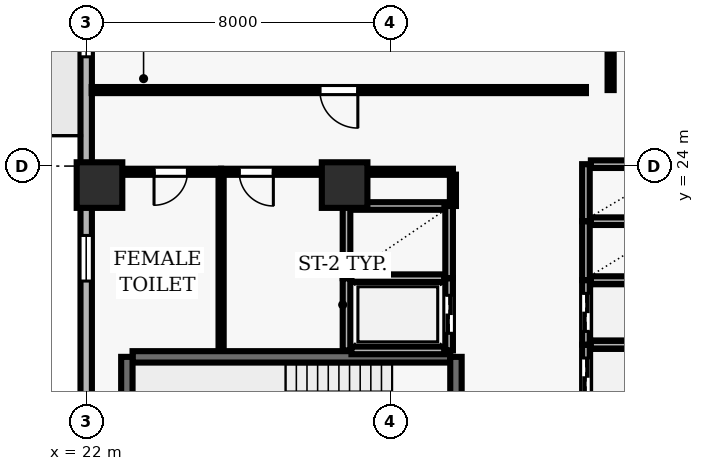
"""IFC4 building model, lengths in metres.
Left out: names, types, materials, properties, quantities, classifications, styles, units other than length and angle.
Written with IfcOpenShell. Run it as: python <this file> out.ifc"""

import sys

from ifc_helpers import new_model, si_unit, direction, frame, frame_2d, origin, origin_2d, place, context, subcontext, project, spatial, rectangle, extrude, element, fill, save


model = new_model("IFC4")
c1 = context("Model", 3, precision=1e-05, world=origin(), true_north=direction((0.0, 1.0)))
c2 = subcontext(c1, "Body", "Model", "MODEL_VIEW")
j1 = project(units=[si_unit("LENGTHUNIT", "METRE"), si_unit("PLANEANGLEUNIT", "RADIAN")], contexts=[c1])
p1 = place(None, origin())
s1 = spatial("IfcSite", under=j1, at=p1, CompositionType="ELEMENT")
p2 = place(p1, origin())
s2 = spatial("IfcBuilding", under=s1, at=p2, CompositionType="ELEMENT")
p3 = place(p2, frame((0.0, 0.0, 103.4)))
s3 = spatial("IfcBuildingStorey", under=s2, at=p3, CompositionType="ELEMENT", Elevation=103.4)
for number, where, z_axis, x_axis in (
    (1, (22.35, 23.5, 0.0), (0.0, 0.0, 1.0), (1.0, 0.0, 0.0)),
    (2, (28.8, 23.5, 0.0), (0.0, 0.0, 1.0), (1.0, 0.0, 0.0)),
):
    element("IfcColumn", number, at=place(p3, frame(where, z_axis=z_axis, x_axis=x_axis)), inside=s3, PredefinedType="COLUMN", context=c2, shape_type="SweptSolid", body=[
        extrude(rectangle(XDim=1.2, YDim=1.2, at=origin_2d()), origin(), (0.0, 0.0, 1.0), 3.9),
    ])
p4 = place(p3, frame((22.0, 46.1, 0.0), z_axis=(0.0, 0.0, 1.0), x_axis=(0.0, -1.0, 0.0)))
e3 = element("IfcWall", 3, at=p4, inside=s3, PredefinedType="SOLIDWALL", context=c2, shape_type="SweptSolid", body=[
    extrude(rectangle(XDim=43.6, YDim=0.3, at=frame_2d((21.8, 0.0))), origin(), (0.0, 0.0, 1.0), 3.69),
])
p5 = place(p4, frame((7.1, 0.0, 0.0)))
e4 = element("IfcOpeningElement", 4, at=p5, cuts=e3, PredefinedType="OPENING", context=c2, shape_type="SweptSolid", body=[
    extrude(rectangle(XDim=1.0, YDim=2.2, at=frame_2d((0.5, 1.1))), frame((0.0, 0.16, 0.0), z_axis=(0.0, -1.0, 0.0), x_axis=(1.0, 0.0, 0.0)), (0.0, 0.0, 1.0), 0.32),
])
p6 = place(p4, frame((2.125, 0.0, 0.9)))
e5 = element("IfcOpeningElement", 5, at=p6, cuts=e3, PredefinedType="OPENING", context=c2, shape_type="SweptSolid", body=[
    extrude(rectangle(XDim=1.2, YDim=1.6, at=frame_2d((0.6, 0.8))), frame((0.0, 0.16, 0.0), z_axis=(0.0, -1.0, 0.0), x_axis=(1.0, 0.0, 0.0)), (0.0, 0.0, 1.0), 0.32),
])
p7 = place(p4, frame((8.475, 0.0, 0.9)))
e6 = element("IfcOpeningElement", 6, at=p7, cuts=e3, PredefinedType="OPENING", context=c2, shape_type="SweptSolid", body=[
    extrude(rectangle(XDim=1.2, YDim=1.6, at=frame_2d((0.6, 0.8))), frame((0.0, 0.16, 0.0), z_axis=(0.0, -1.0, 0.0), x_axis=(1.0, 0.0, 0.0)), (0.0, 0.0, 1.0), 0.32),
])
p8 = place(p4, frame((13.025, 0.0, 0.9)))
e7 = element("IfcOpeningElement", 7, at=p8, cuts=e3, PredefinedType="OPENING", context=c2, shape_type="SweptSolid", body=[
    extrude(rectangle(XDim=1.2, YDim=1.6, at=frame_2d((0.6, 0.8))), frame((0.0, 0.16, 0.0), z_axis=(0.0, -1.0, 0.0), x_axis=(1.0, 0.0, 0.0)), (0.0, 0.0, 1.0), 0.32),
])
p9 = place(p4, frame((18.025, 0.0, 0.9)))
e8 = element("IfcOpeningElement", 8, at=p9, cuts=e3, PredefinedType="OPENING", context=c2, shape_type="SweptSolid", body=[
    extrude(rectangle(XDim=1.2, YDim=1.6, at=frame_2d((0.6, 0.8))), frame((0.0, 0.16, 0.0), z_axis=(0.0, -1.0, 0.0), x_axis=(1.0, 0.0, 0.0)), (0.0, 0.0, 1.0), 0.32),
])
p10 = place(p4, frame((23.925, 0.0, 0.9)))
e9 = element("IfcOpeningElement", 9, at=p10, cuts=e3, PredefinedType="OPENING", context=c2, shape_type="SweptSolid", body=[
    extrude(rectangle(XDim=1.2, YDim=1.6, at=frame_2d((0.6, 0.8))), frame((0.0, 0.16, 0.0), z_axis=(0.0, -1.0, 0.0), x_axis=(1.0, 0.0, 0.0)), (0.0, 0.0, 1.0), 0.32),
])
p11 = place(p4, frame((29.375, 0.0, 0.9)))
e10 = element("IfcOpeningElement", 10, at=p11, cuts=e3, PredefinedType="OPENING", context=c2, shape_type="SweptSolid", body=[
    extrude(rectangle(XDim=1.2, YDim=1.6, at=frame_2d((0.6, 0.8))), frame((0.0, 0.16, 0.0), z_axis=(0.0, -1.0, 0.0), x_axis=(1.0, 0.0, 0.0)), (0.0, 0.0, 1.0), 0.32),
])
p12 = place(p4, frame((34.825, 0.0, 0.9)))
e11 = element("IfcOpeningElement", 11, at=p12, cuts=e3, PredefinedType="OPENING", context=c2, shape_type="SweptSolid", body=[
    extrude(rectangle(XDim=1.2, YDim=1.6, at=frame_2d((0.6, 0.8))), frame((0.0, 0.16, 0.0), z_axis=(0.0, -1.0, 0.0), x_axis=(1.0, 0.0, 0.0)), (0.0, 0.0, 1.0), 0.32),
])
p13 = place(p3, frame((31.58, 18.98, 0.0), z_axis=(0.0, 0.0, 1.0), x_axis=(-1.0, 0.0, 0.0)))
e12 = element("IfcWall", 12, at=p13, inside=s3, PredefinedType="SHEAR", context=c2, shape_type="SweptSolid", body=[
    extrude(rectangle(XDim=8.36, YDim=0.3, at=frame_2d((4.18, 0.0))), origin(), (0.0, 0.0, 1.0), 3.69),
])
p14 = place(p3, frame((23.07, 18.98, 0.0), z_axis=(0.0, 0.0, 1.0), x_axis=(0.0, -1.0, 0.0)))
e13 = element("IfcWall", 13, at=p14, inside=s3, PredefinedType="SHEAR", context=c2, shape_type="SweptSolid", body=[
    extrude(rectangle(XDim=3.51, YDim=0.3, at=frame_2d((1.755, 0.0))), origin(), (0.0, 0.0, 1.0), 3.69),
])
p15 = place(p3, frame((31.73, 15.47, 0.0), z_axis=(0.0, 0.0, 1.0), x_axis=(0.0, 1.0, 0.0)))
e14 = element("IfcWall", 14, at=p15, inside=s3, PredefinedType="SHEAR", context=c2, shape_type="SweptSolid", body=[
    extrude(rectangle(XDim=3.51, YDim=0.3, at=frame_2d((1.755, 0.0))), origin(), (0.0, 0.0, 1.0), 3.69),
])
p16 = place(p15, frame((1.18, 0.0, 0.0)))
e15 = element("IfcOpeningElement", 15, at=p16, cuts=e14, PredefinedType="OPENING", context=c2, shape_type="SweptSolid", body=[
    extrude(rectangle(XDim=1.15, YDim=2.15, at=frame_2d((0.575, 1.075))), frame((0.0, 0.16, 0.0), z_axis=(0.0, -1.0, 0.0), x_axis=(1.0, 0.0, 0.0)), (0.0, 0.0, 1.0), 0.32),
])
p17 = place(p3, frame((35.15, 19.3, 0.0), z_axis=(0.0, 0.0, 1.0), x_axis=(0.0, -1.0, 0.0)))
e16 = element("IfcWall", 16, at=p17, inside=s3, PredefinedType="SOLIDWALL", context=c2, shape_type="SweptSolid", body=[
    extrude(rectangle(XDim=1.7, YDim=0.2, at=frame_2d((0.85, 0.0))), origin(), (0.0, 0.0, 1.0), 3.69),
])
p18 = place(p17, frame((0.35, 0.0, 0.0)))
e17 = element("IfcOpeningElement", 17, at=p18, cuts=e16, PredefinedType="OPENING", context=c2, shape_type="SweptSolid", body=[
    extrude(rectangle(XDim=1.0, YDim=2.1, at=frame_2d((0.5, 1.05))), frame((0.0, 0.11, 0.0), z_axis=(0.0, -1.0, 0.0), x_axis=(1.0, 0.0, 0.0)), (0.0, 0.0, 1.0), 0.22),
])
p19 = place(p3, frame((37.42, 19.3, 0.0), z_axis=(0.0, 0.0, 1.0), x_axis=(-1.0, 0.0, 0.0)))
e18 = element("IfcWall", 18, at=p19, inside=s3, PredefinedType="SOLIDWALL", context=c2, shape_type="SweptSolid", body=[
    extrude(rectangle(XDim=2.14, YDim=0.2, at=frame_2d((1.07, 0.0))), origin(), (0.0, 0.0, 1.0), 3.69),
])
p20 = place(p3, frame((35.15, 21.0, 0.0), z_axis=(0.0, 0.0, 1.0), x_axis=(0.0, -1.0, 0.0)))
e19 = element("IfcWall", 19, at=p20, inside=s3, PredefinedType="SOLIDWALL", context=c2, shape_type="SweptSolid", body=[
    extrude(rectangle(XDim=1.7, YDim=0.2, at=frame_2d((0.85, 0.0))), origin(), (0.0, 0.0, 1.0), 3.69),
])
p21 = place(p20, frame((0.35, 0.0, 0.0)))
e20 = element("IfcOpeningElement", 20, at=p21, cuts=e19, PredefinedType="OPENING", context=c2, shape_type="SweptSolid", body=[
    extrude(rectangle(XDim=1.0, YDim=2.1, at=frame_2d((0.5, 1.05))), frame((0.0, 0.11, 0.0), z_axis=(0.0, -1.0, 0.0), x_axis=(1.0, 0.0, 0.0)), (0.0, 0.0, 1.0), 0.22),
])
p22 = place(p3, frame((37.42, 21.0, 0.0), z_axis=(0.0, 0.0, 1.0), x_axis=(-1.0, 0.0, 0.0)))
e21 = element("IfcWall", 21, at=p22, inside=s3, PredefinedType="SOLIDWALL", context=c2, shape_type="SweptSolid", body=[
    extrude(rectangle(XDim=2.14, YDim=0.2, at=frame_2d((1.07, 0.0))), origin(), (0.0, 0.0, 1.0), 3.69),
])
p23 = place(p3, frame((28.85, 21.05, 0.0), z_axis=(0.0, 0.0, 1.0), x_axis=(0.0, -1.0, 0.0)))
e22 = element("IfcWall", 22, at=p23, inside=s3, PredefinedType="SOLIDWALL", context=c2, shape_type="SweptSolid", body=[
    extrude(rectangle(XDim=1.9, YDim=0.2, at=frame_2d((0.95, 0.0))), origin(), (0.0, 0.0, 1.0), 3.69),
])
p24 = place(p3, frame((31.55, 19.15, 0.0), z_axis=(0.0, 0.0, 1.0), x_axis=(0.0, 1.0, 0.0)))
e23 = element("IfcWall", 23, at=p24, inside=s3, PredefinedType="SOLIDWALL", context=c2, shape_type="SweptSolid", body=[
    extrude(rectangle(XDim=1.9, YDim=0.2, at=frame_2d((0.95, 0.0))), origin(), (0.0, 0.0, 1.0), 3.69),
])
p25 = place(p24, frame((0.45, 0.0, 0.0)))
e24 = element("IfcOpeningElement", 24, at=p25, cuts=e23, PredefinedType="OPENING", context=c2, shape_type="SweptSolid", body=[
    extrude(rectangle(XDim=1.0, YDim=2.1, at=frame_2d((0.5, 1.05))), frame((0.0, 0.11, 0.0), z_axis=(0.0, -1.0, 0.0), x_axis=(1.0, 0.0, 0.0)), (0.0, 0.0, 1.0), 0.22),
])
for number, where, z_axis, x_axis in (
    (25, (28.98, 19.15, 0.0), (0.0, 0.0, 1.0), (1.0, 0.0, 0.0)),
    (26, (31.42, 21.05, 0.0), (0.0, 0.0, 1.0), (-1.0, 0.0, 0.0)),
):
    element("IfcWall", number, at=place(p3, frame(where, z_axis=z_axis, x_axis=x_axis)), inside=s3, PredefinedType="SOLIDWALL", context=c2, shape_type="SweptSolid", body=[
        extrude(rectangle(XDim=2.44, YDim=0.2, at=frame_2d((1.22, 0.0))), origin(), (0.0, 0.0, 1.0), 3.69),
    ])
p26 = place(p3, frame((35.15, 22.55, 0.0), z_axis=(0.0, 0.0, 1.0), x_axis=(0.0, -1.0, 0.0)))
e27 = element("IfcWall", 27, at=p26, inside=s3, PredefinedType="SOLIDWALL", context=c2, shape_type="SweptSolid", body=[
    extrude(rectangle(XDim=1.55, YDim=0.2, at=frame_2d((0.775, 0.0))), origin(), (0.0, 0.0, 1.0), 3.69),
])
p27 = place(p3, frame((37.42, 22.55, 0.0), z_axis=(0.0, 0.0, 1.0), x_axis=(-1.0, 0.0, 0.0)))
e28 = element("IfcWall", 28, at=p27, inside=s3, PredefinedType="SOLIDWALL", context=c2, shape_type="SweptSolid", body=[
    extrude(rectangle(XDim=2.14, YDim=0.2, at=frame_2d((1.07, 0.0))), origin(), (0.0, 0.0, 1.0), 3.69),
])
p28 = place(p3, frame((35.15, 24.05, 0.0), z_axis=(0.0, 0.0, 1.0), x_axis=(0.0, -1.0, 0.0)))
e29 = element("IfcWall", 29, at=p28, inside=s3, PredefinedType="SOLIDWALL", context=c2, shape_type="SweptSolid", body=[
    extrude(rectangle(XDim=1.5, YDim=0.2, at=frame_2d((0.75, 0.0))), origin(), (0.0, 0.0, 1.0), 3.69),
])
p29 = place(p3, frame((37.42, 24.05, 0.0), z_axis=(0.0, 0.0, 1.0), x_axis=(-1.0, 0.0, 0.0)))
e30 = element("IfcWall", 30, at=p29, inside=s3, PredefinedType="SOLIDWALL", context=c2, shape_type="SweptSolid", body=[
    extrude(rectangle(XDim=2.14, YDim=0.2, at=frame_2d((1.07, 0.0))), origin(), (0.0, 0.0, 1.0), 3.69),
])
for number, where, z_axis, x_axis in (
    (31, (28.85, 22.95, 0.0), (0.0, 0.0, 1.0), (0.0, -1.0, 0.0)),
    (32, (31.55, 21.05, 0.0), (0.0, 0.0, 1.0), (0.0, 1.0, 0.0)),
):
    element("IfcWall", number, at=place(p3, frame(where, z_axis=z_axis, x_axis=x_axis)), inside=s3, PredefinedType="SOLIDWALL", context=c2, shape_type="SweptSolid", body=[
        extrude(rectangle(XDim=1.9, YDim=0.2, at=frame_2d((0.95, 0.0))), origin(), (0.0, 0.0, 1.0), 3.69),
    ])
p30 = place(p3, frame((31.43, 22.95, 0.0), z_axis=(0.0, 0.0, 1.0), x_axis=(-1.0, 0.0, 0.0)))
e33 = element("IfcWall", 33, at=p30, inside=s3, PredefinedType="SOLIDWALL", context=c2, shape_type="SweptSolid", body=[
    extrude(rectangle(XDim=2.46, YDim=0.2, at=frame_2d((1.23, 0.0))), origin(), (0.0, 0.0, 1.0), 3.69),
])
p31 = place(p3, frame((25.55, 23.85, 0.0), z_axis=(0.0, 0.0, 1.0), x_axis=(-1.0, 0.0, 0.0)))
e34 = element("IfcWall", 34, at=p31, inside=s3, PredefinedType="PARTITIONING", context=c2, shape_type="SweptSolid", body=[
    extrude(rectangle(XDim=3.35, YDim=0.16, at=frame_2d((1.675, 0.0))), origin(), (0.0, 0.0, 1.0), 3.074),
])
p32 = place(p31, frame((0.885, 0.0, 0.0)))
e35 = element("IfcOpeningElement", 35, at=p32, cuts=e34, PredefinedType="OPENING", context=c2, shape_type="SweptSolid", body=[
    extrude(rectangle(XDim=0.88, YDim=2.1, at=frame_2d((0.44, 1.05))), frame((0.0, 0.09, 0.0), z_axis=(0.0, -1.0, 0.0), x_axis=(1.0, 0.0, 0.0)), (0.0, 0.0, 1.0), 0.18),
])
p33 = place(p3, frame((28.8, 23.85, 0.0), z_axis=(0.0, 0.0, 1.0), x_axis=(-1.0, 0.0, 0.0)))
e36 = element("IfcWall", 36, at=p33, inside=s3, PredefinedType="PARTITIONING", context=c2, shape_type="SweptSolid", body=[
    extrude(rectangle(XDim=3.25, YDim=0.16, at=frame_2d((1.625, 0.0))), origin(), (0.0, 0.0, 1.0), 3.074),
])
p34 = place(p33, frame((1.875, 0.0, 0.0)))
e37 = element("IfcOpeningElement", 37, at=p34, cuts=e36, PredefinedType="OPENING", context=c2, shape_type="SweptSolid", body=[
    extrude(rectangle(XDim=0.9, YDim=2.1, at=frame_2d((0.45, 1.05))), frame((0.0, 0.09, 0.0), z_axis=(0.0, -1.0, 0.0), x_axis=(1.0, 0.0, 0.0)), (0.0, 0.0, 1.0), 0.18),
])
p35 = place(p3, frame((28.8, 23.85, 0.0), z_axis=(0.0, 0.0, 1.0), x_axis=(1.0, 0.0, 0.0)))
e38 = element("IfcWall", 38, at=p35, inside=s3, PredefinedType="PARTITIONING", context=c2, shape_type="SweptSolid", body=[
    extrude(rectangle(XDim=2.85, YDim=0.16, at=frame_2d((1.425, 0.0))), origin(), (0.0, 0.0, 1.0), 3.074),
])
p36 = place(p3, frame((35.15, 26.0, 0.0), z_axis=(0.0, 0.0, 1.0), x_axis=(-1.0, 0.0, 0.0)))
e39 = element("IfcWall", 39, at=p36, inside=s3, PredefinedType="PARTITIONING", context=c2, shape_type="SweptSolid", body=[
    extrude(rectangle(XDim=13.005, YDim=0.16, at=frame_2d((6.502, 0.0))), origin(), (0.0, 0.0, 1.0), 3.69),
])
p37 = place(p36, frame((6.002, 0.0, 0.0)))
e40 = element("IfcOpeningElement", 40, at=p37, cuts=e39, PredefinedType="OPENING", context=c2, shape_type="SweptSolid", body=[
    extrude(rectangle(XDim=1.0, YDim=2.1, at=frame_2d((0.5, 1.05))), frame((0.0, 0.09, 0.0), z_axis=(0.0, -1.0, 0.0), x_axis=(1.0, 0.0, 0.0)), (0.0, 0.0, 1.0), 0.18),
])
p38 = place(p3, frame((25.55, 19.16, 0.0), z_axis=(0.0, 0.0, 1.0), x_axis=(0.0, 1.0, 0.0)))
e41 = element("IfcWall", 41, at=p38, inside=s3, PredefinedType="PARTITIONING", context=c2, shape_type="SweptSolid", body=[
    extrude(rectangle(XDim=4.615, YDim=0.135, at=frame_2d((2.308, 0.0))), origin(), (0.0, 0.0, 1.0), 3.69),
])
p39 = place(p3, frame((28.8, 22.95, 0.0), z_axis=(0.0, 0.0, 1.0), x_axis=(0.0, 1.0, 0.0)))
e42 = element("IfcWall", 42, at=p39, inside=s3, PredefinedType="PARTITIONING", context=c2, shape_type="SweptSolid", body=[
    extrude(rectangle(XDim=0.825, YDim=0.125, at=frame_2d((0.413, 0.0))), origin(), (0.0, 0.0, 1.0), 3.69),
])
p40 = place(p3, frame((31.65, 23.775, 0.0), z_axis=(0.0, 0.0, 1.0), x_axis=(0.0, -1.0, 0.0)))
e43 = element("IfcWall", 43, at=p40, inside=s3, PredefinedType="PARTITIONING", context=c2, shape_type="SweptSolid", body=[
    extrude(rectangle(XDim=0.825, YDim=0.16, at=frame_2d((0.413, 0.0))), origin(), (0.0, 0.0, 1.0), 3.69),
])
p41 = place(p3, frame((35.8, 33.612, 0.0), z_axis=(0.0, 0.0, 1.0), x_axis=(0.0, -1.0, 0.0)))
e44 = element("IfcWall", 44, at=p41, inside=s3, PredefinedType="PARTITIONING", context=c2, shape_type="SweptSolid", body=[
    extrude(rectangle(XDim=7.612, YDim=0.16, at=frame_2d((3.806, 0.0))), origin(), (0.0, 0.0, 1.0), 3.69),
])
p42 = place(p9, origin())
e45 = element("IfcWindow", 45, at=p42, inside=s3, PartitioningType="SINGLE_PANEL", PredefinedType="WINDOW", context=c2, shape_type="SweptSolid", body=[
    extrude(rectangle(XDim=1.2, YDim=1.6, at=frame_2d((0.6, 0.8))), frame((0.0, 0.03, 0.0), z_axis=(0.0, -1.0, 0.0), x_axis=(1.0, 0.0, 0.0)), (0.0, 0.0, 1.0), 0.06),
])
fill(e8, e45)
p43 = place(p10, origin())
e46 = element("IfcWindow", 46, at=p43, inside=s3, PartitioningType="SINGLE_PANEL", PredefinedType="WINDOW", context=c2, shape_type="SweptSolid", body=[
    extrude(rectangle(XDim=1.2, YDim=1.6, at=frame_2d((0.6, 0.8))), frame((0.0, 0.03, 0.0), z_axis=(0.0, -1.0, 0.0), x_axis=(1.0, 0.0, 0.0)), (0.0, 0.0, 1.0), 0.06),
])
fill(e9, e46)
p44 = place(p18, origin())
e47 = element("IfcDoor", 47, at=p44, inside=s3, OperationType="DOUBLE_DOOR_SLIDING", PredefinedType="DOOR", context=c2, shape_type="SweptSolid", body=[
    extrude(rectangle(XDim=1.0, YDim=2.1, at=frame_2d((0.5, 1.05))), frame((0.0, 0.025, 0.0), z_axis=(0.0, -1.0, 0.0), x_axis=(1.0, 0.0, 0.0)), (0.0, 0.0, 1.0), 0.05),
])
fill(e17, e47)
p45 = place(p21, origin())
e48 = element("IfcDoor", 48, at=p45, inside=s3, OperationType="DOUBLE_DOOR_SLIDING", PredefinedType="DOOR", context=c2, shape_type="SweptSolid", body=[
    extrude(rectangle(XDim=1.0, YDim=2.1, at=frame_2d((0.5, 1.05))), frame((0.0, 0.025, 0.0), z_axis=(0.0, -1.0, 0.0), x_axis=(1.0, 0.0, 0.0)), (0.0, 0.0, 1.0), 0.05),
])
fill(e20, e48)
p46 = place(p25, origin())
e49 = element("IfcDoor", 49, at=p46, inside=s3, OperationType="DOUBLE_DOOR_SLIDING", PredefinedType="DOOR", context=c2, shape_type="SweptSolid", body=[
    extrude(rectangle(XDim=1.0, YDim=2.1, at=frame_2d((0.5, 1.05))), frame((0.0, 0.025, 0.0), z_axis=(0.0, -1.0, 0.0), x_axis=(1.0, 0.0, 0.0)), (0.0, 0.0, 1.0), 0.05),
])
fill(e24, e49)
p47 = place(p32, origin())
e50 = element("IfcDoor", 50, at=p47, inside=s3, OperationType="SINGLE_SWING_RIGHT", PredefinedType="DOOR", context=c2, shape_type="SweptSolid", body=[
    extrude(rectangle(XDim=0.88, YDim=2.1, at=frame_2d((0.44, 1.05))), frame((0.0, 0.025, 0.0), z_axis=(0.0, -1.0, 0.0), x_axis=(1.0, 0.0, 0.0)), (0.0, 0.0, 1.0), 0.05),
])
fill(e35, e50)
p48 = place(p34, origin())
e51 = element("IfcDoor", 51, at=p48, inside=s3, OperationType="SINGLE_SWING_LEFT", PredefinedType="DOOR", context=c2, shape_type="SweptSolid", body=[
    extrude(rectangle(XDim=0.9, YDim=2.1, at=frame_2d((0.45, 1.05))), frame((0.0, 0.025, 0.0), z_axis=(0.0, -1.0, 0.0), x_axis=(1.0, 0.0, 0.0)), (0.0, 0.0, 1.0), 0.05),
])
fill(e37, e51)
p49 = place(p37, origin())
e52 = element("IfcDoor", 52, at=p49, inside=s3, OperationType="SINGLE_SWING_LEFT", PredefinedType="DOOR", context=c2, shape_type="SweptSolid", body=[
    extrude(rectangle(XDim=1.0, YDim=2.1, at=frame_2d((0.5, 1.05))), frame((0.0, 0.025, 0.0), z_axis=(0.0, -1.0, 0.0), x_axis=(1.0, 0.0, 0.0)), (0.0, 0.0, 1.0), 0.05),
])
fill(e40, e52)
save(model, sys.argv[1])
